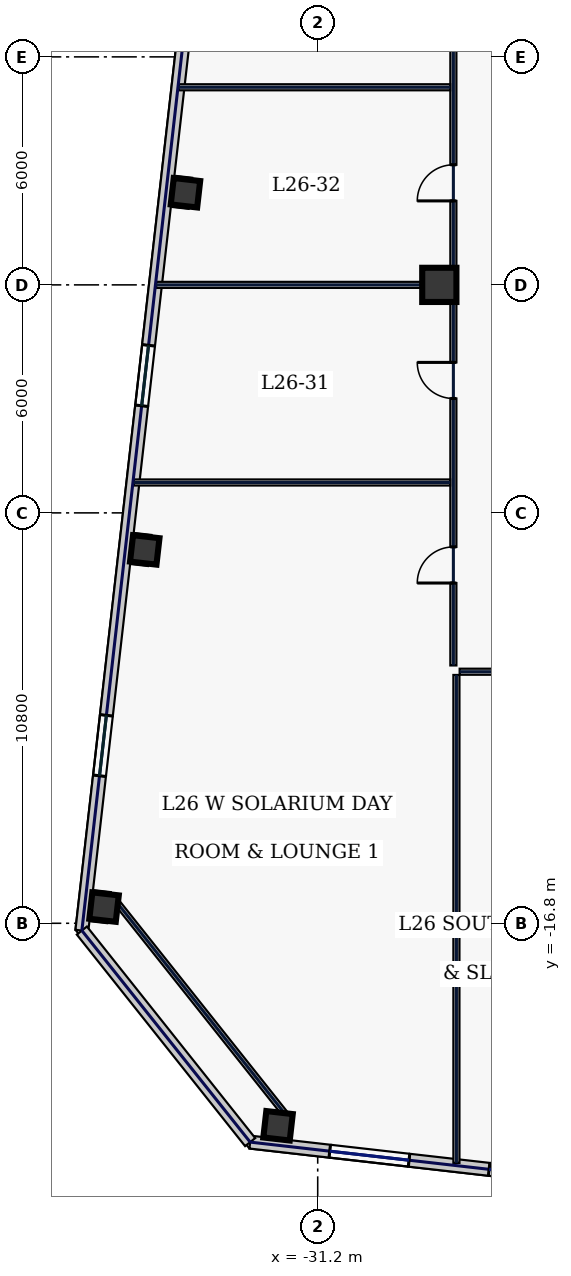
"""IFC4 building model, lengths in metres.
Left out: names, types, materials, properties, quantities, classifications, styles, units other than length and angle.
Written with IfcOpenShell. Run it as: python <this file> out.ifc"""

import sys

from ifc_helpers import new_model, si_unit, direction, frame, frame_2d, origin, origin_2d, place, context, subcontext, project, spatial, rectangle, hollow_rectangle, extrude, element, fill, save


model = new_model("IFC4")
c1 = context("Model", 3, precision=1e-05, world=origin(), true_north=direction((0.0, 1.0)))
c2 = subcontext(c1, "Body", "Model", "MODEL_VIEW")
j1 = project(units=[si_unit("LENGTHUNIT", "METRE"), si_unit("PLANEANGLEUNIT", "RADIAN")], contexts=[c1])
p1 = place(None, origin())
s1 = spatial("IfcSite", under=j1, at=p1, CompositionType="ELEMENT")
p2 = place(p1, origin())
s2 = spatial("IfcBuilding", under=s1, at=p2, CompositionType="ELEMENT")
p3 = place(p2, frame((0.0, 0.0, 117.4)))
s3 = spatial("IfcBuildingStorey", under=s2, at=p3, CompositionType="ELEMENT", Elevation=117.4)
p4 = place(p3, frame((-28.0, 0.0, 0.0), z_axis=(0.0, 0.0, 1.0), x_axis=(1.0, 0.0, 0.0)))
e1 = element("IfcColumn", 1, at=p4, inside=s3, PredefinedType="COLUMN", context=c2, shape_type="SweptSolid", body=[
    extrude(hollow_rectangle(XDim=0.9, YDim=0.9, WallThickness=0.04, at=origin_2d()), origin(), (0.0, 0.0, 1.0), 3.74),
])
for number, where, z_axis, x_axis in (
    (2, (-32.244, -22.129, 0.0), (0.0, 0.0, 1.0), (0.994, -0.113, 0.0)),
    (3, (-34.68, 2.425, 0.0), (0.0, 0.0, 1.0), (0.994, -0.113, 0.0)),
    (4, (-35.751, -6.974, 0.0), (0.0, 0.0, 1.0), (0.994, -0.113, 0.0)),
    (5, (-36.822, -16.374, 0.0), (0.0, 0.0, 1.0), (0.994, -0.113, 0.0)),
):
    element("IfcColumn", number, at=place(p3, frame(where, z_axis=z_axis, x_axis=x_axis)), inside=s3, PredefinedType="COLUMN", context=c2, shape_type="SweptSolid", body=[
        extrude(hollow_rectangle(XDim=0.7, YDim=0.7, WallThickness=0.032, at=origin_2d()), origin(), (0.0, 0.0, 1.0), 3.74),
    ])
p5 = place(p3, frame((-32.977, -22.559, 0.0), z_axis=(0.0, 0.0, 1.0), x_axis=(0.993571214605, -0.113208840243, 0.0)))
e6 = element("IfcWall", 6, at=p5, inside=s3, PredefinedType="STANDARD", context=c2, shape_type="SweptSolid", body=[
    extrude(rectangle(XDim=21.223, YDim=0.34, at=frame_2d((10.611, 0.0))), origin(), (0.0, 0.0, 1.0), 3.74),
])
p6 = place(p5, frame((2.108, 0.0, 0.67)))
e7 = element("IfcOpeningElement", 7, at=p6, cuts=e6, PredefinedType="OPENING", context=c2, shape_type="SweptSolid", body=[
    extrude(rectangle(XDim=2.1, YDim=2.2, at=frame_2d((1.05, 1.1))), frame((0.0, 0.18, 0.0), z_axis=(0.0, -1.0, 0.0), x_axis=(1.0, 0.0, 0.0)), (0.0, 0.0, 1.0), 0.36),
])
p7 = place(p5, frame((6.329, 0.0, 0.67)))
e8 = element("IfcOpeningElement", 8, at=p7, cuts=e6, PredefinedType="OPENING", context=c2, shape_type="SweptSolid", body=[
    extrude(rectangle(XDim=2.1, YDim=2.2, at=frame_2d((1.05, 1.1))), frame((0.0, 0.18, 0.0), z_axis=(0.0, -1.0, 0.0), x_axis=(1.0, 0.0, 0.0)), (0.0, 0.0, 1.0), 0.36),
])
p8 = place(p5, frame((11.285, 0.0, 0.67)))
e9 = element("IfcOpeningElement", 9, at=p8, cuts=e6, PredefinedType="OPENING", context=c2, shape_type="SweptSolid", body=[
    extrude(rectangle(XDim=2.1, YDim=2.2, at=frame_2d((1.05, 1.1))), frame((0.0, 0.18, 0.0), z_axis=(0.0, -1.0, 0.0), x_axis=(1.0, 0.0, 0.0)), (0.0, 0.0, 1.0), 0.36),
])
p9 = place(p5, frame((15.506, 0.0, 0.67)))
e10 = element("IfcOpeningElement", 10, at=p9, cuts=e6, PredefinedType="OPENING", context=c2, shape_type="SweptSolid", body=[
    extrude(rectangle(XDim=0.85, YDim=1.85, at=frame_2d((0.425, 0.925))), frame((0.0, 0.18, 0.0), z_axis=(0.0, -1.0, 0.0), x_axis=(1.0, 0.0, 0.0)), (0.0, 0.0, 1.0), 0.36),
])
p10 = place(p3, frame((-32.968, 21.957, 0.0), z_axis=(0.0, 0.0, 1.0), x_axis=(-0.113201605824, -0.993572038877, 0.0)))
e11 = element("IfcWall", 11, at=p10, inside=s3, PredefinedType="STANDARD", context=c2, shape_type="SweptSolid", body=[
    extrude(rectangle(XDim=39.2, YDim=0.34, at=frame_2d((19.6, 0.0))), origin(), (0.0, 0.0, 1.0), 3.74),
])
p11 = place(p10, frame((4.1, 0.0, 0.58)))
e12 = element("IfcOpeningElement", 12, at=p11, cuts=e11, PredefinedType="OPENING", context=c2, shape_type="SweptSolid", body=[
    extrude(rectangle(XDim=1.6, YDim=2.3, at=frame_2d((0.8, 1.15))), frame((0.0, 0.18, 0.0), z_axis=(0.0, -1.0, 0.0), x_axis=(1.0, 0.0, 0.0)), (0.0, 0.0, 1.0), 0.36),
])
p12 = place(p10, frame((13.9, 0.0, 0.58)))
e13 = element("IfcOpeningElement", 13, at=p12, cuts=e11, PredefinedType="OPENING", context=c2, shape_type="SweptSolid", body=[
    extrude(rectangle(XDim=1.6, YDim=2.3, at=frame_2d((0.8, 1.15))), frame((0.0, 0.18, 0.0), z_axis=(0.0, -1.0, 0.0), x_axis=(1.0, 0.0, 0.0)), (0.0, 0.0, 1.0), 0.36),
])
p13 = place(p10, frame((23.7, 0.0, 0.58)))
e14 = element("IfcOpeningElement", 14, at=p13, cuts=e11, PredefinedType="OPENING", context=c2, shape_type="SweptSolid", body=[
    extrude(rectangle(XDim=1.6, YDim=2.3, at=frame_2d((0.8, 1.15))), frame((0.0, 0.18, 0.0), z_axis=(0.0, -1.0, 0.0), x_axis=(1.0, 0.0, 0.0)), (0.0, 0.0, 1.0), 0.36),
])
p14 = place(p10, frame((33.5, 0.0, 0.58)))
e15 = element("IfcOpeningElement", 15, at=p14, cuts=e11, PredefinedType="OPENING", context=c2, shape_type="SweptSolid", body=[
    extrude(rectangle(XDim=1.6, YDim=2.3, at=frame_2d((0.8, 1.15))), frame((0.0, 0.18, 0.0), z_axis=(0.0, -1.0, 0.0), x_axis=(1.0, 0.0, 0.0)), (0.0, 0.0, 1.0), 0.36),
])
p15 = place(p3, frame((-37.406, -16.991, 0.0), z_axis=(0.0, 0.0, 1.0), x_axis=(0.622507800567, -0.78261359446, 0.0)))
e16 = element("IfcWall", 16, at=p15, inside=s3, PredefinedType="STANDARD", context=c2, shape_type="SweptSolid", body=[
    extrude(rectangle(XDim=7.114, YDim=0.34, at=frame_2d((3.557, 0.0))), origin(), (0.0, 0.0, 1.0), 3.74),
])
p16 = place(p3, frame((-36.556, -16.162, 0.0), z_axis=(0.0, 0.0, 1.0), x_axis=(0.622522641622, -0.782601789334, 0.0)))
e17 = element("IfcWall", 17, at=p16, inside=s3, PredefinedType="PARTITIONING", context=c2, shape_type="SweptSolid", body=[
    extrude(rectangle(XDim=7.354, YDim=0.16, at=frame_2d((3.677, 0.0))), origin(), (0.0, 0.0, 1.0), 3.74),
])
p17 = place(p3, frame((-27.63, -10.015, 0.0), z_axis=(0.0, 0.0, 1.0), x_axis=(0.0, 1.0, 0.0)))
e18 = element("IfcWall", 18, at=p17, inside=s3, PredefinedType="PARTITIONING", context=c2, shape_type="SweptSolid", body=[
    extrude(rectangle(XDim=20.13, YDim=0.16, at=frame_2d((10.065, 0.0))), origin(), (0.0, 0.0, 1.0), 3.74),
])
p18 = place(p17, frame((2.169, 0.0, 0.0)))
e19 = element("IfcOpeningElement", 19, at=p18, cuts=e18, PredefinedType="OPENING", context=c2, shape_type="SweptSolid", body=[
    extrude(rectangle(XDim=0.95, YDim=2.2, at=frame_2d((0.475, 1.1))), frame((0.0, 0.09, 0.0), z_axis=(0.0, -1.0, 0.0), x_axis=(1.0, 0.0, 0.0)), (0.0, 0.0, 1.0), 0.18),
])
p19 = place(p17, frame((7.025, 0.0, 0.0)))
e20 = element("IfcOpeningElement", 20, at=p19, cuts=e18, PredefinedType="OPENING", context=c2, shape_type="SweptSolid", body=[
    extrude(rectangle(XDim=0.95, YDim=2.2, at=frame_2d((0.475, 1.1))), frame((0.0, 0.09, 0.0), z_axis=(0.0, -1.0, 0.0), x_axis=(1.0, 0.0, 0.0)), (0.0, 0.0, 1.0), 0.18),
])
p20 = place(p17, frame((12.225, 0.0, 0.0)))
e21 = element("IfcOpeningElement", 21, at=p20, cuts=e18, PredefinedType="OPENING", context=c2, shape_type="SweptSolid", body=[
    extrude(rectangle(XDim=0.95, YDim=2.2, at=frame_2d((0.475, 1.1))), frame((0.0, 0.09, 0.0), z_axis=(0.0, -1.0, 0.0), x_axis=(1.0, 0.0, 0.0)), (0.0, 0.0, 1.0), 0.18),
])
p21 = place(p17, frame((17.131, 0.0, 0.0)))
e22 = element("IfcOpeningElement", 22, at=p21, cuts=e18, PredefinedType="OPENING", context=c2, shape_type="SweptSolid", body=[
    extrude(rectangle(XDim=0.95, YDim=2.2, at=frame_2d((0.475, 1.1))), frame((0.0, 0.09, 0.0), z_axis=(0.0, -1.0, 0.0), x_axis=(1.0, 0.0, 0.0)), (0.0, 0.0, 1.0), 0.18),
])
p22 = place(p3, frame((27.465, -10.18, 0.0), z_axis=(0.0, 0.0, 1.0), x_axis=(-1.0, 0.0, 0.0)))
e23 = element("IfcWall", 23, at=p22, inside=s3, PredefinedType="PARTITIONING", context=c2, shape_type="SweptSolid", body=[
    extrude(rectangle(XDim=54.93, YDim=0.16, at=frame_2d((27.465, 0.0))), origin(), (0.0, 0.0, 1.0), 3.74),
])
p23 = place(p22, frame((52.106, 0.0, 0.0)))
e24 = element("IfcOpeningElement", 24, at=p23, cuts=e23, PredefinedType="OPENING", context=c2, shape_type="SweptSolid", body=[
    extrude(rectangle(XDim=1.05, YDim=2.2, at=frame_2d((0.525, 1.1))), frame((0.0, 0.09, 0.0), z_axis=(0.0, -1.0, 0.0), x_axis=(1.0, 0.0, 0.0)), (0.0, 0.0, 1.0), 0.18),
])
p24 = place(p22, frame((46.125, 0.0, 0.0)))
e25 = element("IfcOpeningElement", 25, at=p24, cuts=e23, PredefinedType="OPENING", context=c2, shape_type="SweptSolid", body=[
    extrude(rectangle(XDim=0.95, YDim=2.2, at=frame_2d((0.475, 1.1))), frame((0.0, 0.09, 0.0), z_axis=(0.0, -1.0, 0.0), x_axis=(1.0, 0.0, 0.0)), (0.0, 0.0, 1.0), 0.18),
])
p25 = place(p22, frame((39.25, 0.0, 0.0)))
e26 = element("IfcOpeningElement", 26, at=p25, cuts=e23, PredefinedType="OPENING", context=c2, shape_type="SweptSolid", body=[
    extrude(rectangle(XDim=0.95, YDim=2.2, at=frame_2d((0.475, 1.1))), frame((0.0, 0.09, 0.0), z_axis=(0.0, -1.0, 0.0), x_axis=(1.0, 0.0, 0.0)), (0.0, 0.0, 1.0), 0.18),
])
p26 = place(p22, frame((33.65, 0.0, 0.0)))
e27 = element("IfcOpeningElement", 27, at=p26, cuts=e23, PredefinedType="OPENING", context=c2, shape_type="SweptSolid", body=[
    extrude(rectangle(XDim=0.95, YDim=2.2, at=frame_2d((0.475, 1.1))), frame((0.0, 0.09, 0.0), z_axis=(0.0, -1.0, 0.0), x_axis=(1.0, 0.0, 0.0)), (0.0, 0.0, 1.0), 0.18),
])
p27 = place(p22, frame((27.775, 0.0, 0.0)))
e28 = element("IfcOpeningElement", 28, at=p27, cuts=e23, PredefinedType="OPENING", context=c2, shape_type="SweptSolid", body=[
    extrude(rectangle(XDim=1.3, YDim=2.2, at=frame_2d((0.65, 1.1))), frame((0.0, 0.09, 0.0), z_axis=(0.0, -1.0, 0.0), x_axis=(1.0, 0.0, 0.0)), (0.0, 0.0, 1.0), 0.18),
])
p28 = place(p22, frame((21.975, 0.0, 0.0)))
e29 = element("IfcOpeningElement", 29, at=p28, cuts=e23, PredefinedType="OPENING", context=c2, shape_type="SweptSolid", body=[
    extrude(rectangle(XDim=1.3, YDim=2.2, at=frame_2d((0.65, 1.1))), frame((0.0, 0.09, 0.0), z_axis=(0.0, -1.0, 0.0), x_axis=(1.0, 0.0, 0.0)), (0.0, 0.0, 1.0), 0.18),
])
p29 = place(p22, frame((16.475, 0.0, 0.0)))
e30 = element("IfcOpeningElement", 30, at=p29, cuts=e23, PredefinedType="OPENING", context=c2, shape_type="SweptSolid", body=[
    extrude(rectangle(XDim=1.3, YDim=2.2, at=frame_2d((0.65, 1.1))), frame((0.0, 0.09, 0.0), z_axis=(0.0, -1.0, 0.0), x_axis=(1.0, 0.0, 0.0)), (0.0, 0.0, 1.0), 0.18),
])
p30 = place(p22, frame((11.45, 0.0, 0.0)))
e31 = element("IfcOpeningElement", 31, at=p30, cuts=e23, PredefinedType="OPENING", context=c2, shape_type="SweptSolid", body=[
    extrude(rectangle(XDim=0.95, YDim=2.2, at=frame_2d((0.475, 1.1))), frame((0.0, 0.09, 0.0), z_axis=(0.0, -1.0, 0.0), x_axis=(1.0, 0.0, 0.0)), (0.0, 0.0, 1.0), 0.18),
])
p31 = place(p22, frame((6.625, 0.0, 0.0)))
e32 = element("IfcOpeningElement", 32, at=p31, cuts=e23, PredefinedType="OPENING", context=c2, shape_type="SweptSolid", body=[
    extrude(rectangle(XDim=0.95, YDim=2.2, at=frame_2d((0.475, 1.1))), frame((0.0, 0.09, 0.0), z_axis=(0.0, -1.0, 0.0), x_axis=(1.0, 0.0, 0.0)), (0.0, 0.0, 1.0), 0.18),
])
p32 = place(p22, frame((2.044, 0.0, 0.0)))
e33 = element("IfcOpeningElement", 33, at=p32, cuts=e23, PredefinedType="OPENING", context=c2, shape_type="SweptSolid", body=[
    extrude(rectangle(XDim=0.95, YDim=2.2, at=frame_2d((0.475, 1.1))), frame((0.0, 0.09, 0.0), z_axis=(0.0, -1.0, 0.0), x_axis=(1.0, 0.0, 0.0)), (0.0, 0.0, 1.0), 0.18),
])
p33 = place(p3, frame((-27.55, -23.106, 0.0), z_axis=(0.0, 0.0, 1.0), x_axis=(0.0, 1.0, 0.0)))
e34 = element("IfcWall", 34, at=p33, inside=s3, PredefinedType="PARTITIONING", context=c2, shape_type="SweptSolid", body=[
    extrude(rectangle(XDim=12.842, YDim=0.16, at=frame_2d((6.421, 0.0))), origin(), (0.0, 0.0, 1.0), 3.74),
])
p34 = place(p3, frame((-36.042, -5.2, 0.0), z_axis=(0.0, 0.0, 1.0), x_axis=(1.0, 0.0, 0.0)))
e35 = element("IfcWall", 35, at=p34, inside=s3, PredefinedType="PARTITIONING", context=c2, shape_type="SweptSolid", body=[
    extrude(rectangle(XDim=8.327, YDim=0.16, at=frame_2d((4.164, 0.0))), origin(), (0.0, 0.0, 1.0), 3.74),
])
p35 = place(p3, frame((-35.449, 0.0, 0.0), z_axis=(0.0, 0.0, 1.0), x_axis=(1.0, 0.0, 0.0)))
e36 = element("IfcWall", 36, at=p35, inside=s3, PredefinedType="PARTITIONING", context=c2, shape_type="SweptSolid", body=[
    extrude(rectangle(XDim=7.734, YDim=0.16, at=frame_2d((3.867, 0.0))), origin(), (0.0, 0.0, 1.0), 3.74),
])
p36 = place(p3, frame((-34.857, 5.2, 0.0), z_axis=(0.0, 0.0, 1.0), x_axis=(1.0, 0.0, 0.0)))
e37 = element("IfcWall", 37, at=p36, inside=s3, PredefinedType="PARTITIONING", context=c2, shape_type="SweptSolid", body=[
    extrude(rectangle(XDim=7.142, YDim=0.16, at=frame_2d((3.571, 0.0))), origin(), (0.0, 0.0, 1.0), 3.74),
])
p37 = place(p6, origin())
e38 = element("IfcWindow", 38, at=p37, inside=s3, PartitioningType="SINGLE_PANEL", PredefinedType="WINDOW", context=c2, shape_type="SweptSolid", body=[
    extrude(rectangle(XDim=2.1, YDim=2.2, at=frame_2d((1.05, 1.1))), frame((0.0, 0.03, 0.0), z_axis=(0.0, -1.0, 0.0), x_axis=(1.0, 0.0, 0.0)), (0.0, 0.0, 1.0), 0.06),
])
fill(e7, e38)
p38 = place(p7, origin())
e39 = element("IfcWindow", 39, at=p38, inside=s3, PartitioningType="SINGLE_PANEL", PredefinedType="WINDOW", context=c2, shape_type="SweptSolid", body=[
    extrude(rectangle(XDim=2.1, YDim=2.2, at=frame_2d((1.05, 1.1))), frame((0.0, 0.03, 0.0), z_axis=(0.0, -1.0, 0.0), x_axis=(1.0, 0.0, 0.0)), (0.0, 0.0, 1.0), 0.06),
])
fill(e8, e39)
p39 = place(p13, origin())
e40 = element("IfcWindow", 40, at=p39, inside=s3, PartitioningType="SINGLE_PANEL", PredefinedType="WINDOW", context=c2, shape_type="SweptSolid", body=[
    extrude(rectangle(XDim=1.6, YDim=2.3, at=frame_2d((0.8, 1.15))), frame((0.0, 0.03, 0.0), z_axis=(0.0, -1.0, 0.0), x_axis=(1.0, 0.0, 0.0)), (0.0, 0.0, 1.0), 0.06),
])
fill(e14, e40)
p40 = place(p14, origin())
e41 = element("IfcWindow", 41, at=p40, inside=s3, PartitioningType="SINGLE_PANEL", PredefinedType="WINDOW", context=c2, shape_type="SweptSolid", body=[
    extrude(rectangle(XDim=1.6, YDim=2.3, at=frame_2d((0.8, 1.15))), frame((0.0, 0.03, 0.0), z_axis=(0.0, -1.0, 0.0), x_axis=(1.0, 0.0, 0.0)), (0.0, 0.0, 1.0), 0.06),
])
fill(e15, e41)
p41 = place(p18, origin())
e42 = element("IfcDoor", 42, at=p41, inside=s3, OperationType="SINGLE_SWING_LEFT", PredefinedType="DOOR", context=c2, shape_type="SweptSolid", body=[
    extrude(rectangle(XDim=0.95, YDim=2.2, at=frame_2d((0.475, 1.1))), frame((0.0, 0.025, 0.0), z_axis=(0.0, -1.0, 0.0), x_axis=(1.0, 0.0, 0.0)), (0.0, 0.0, 1.0), 0.05),
])
fill(e19, e42)
p42 = place(p19, origin())
e43 = element("IfcDoor", 43, at=p42, inside=s3, OperationType="SINGLE_SWING_RIGHT", PredefinedType="DOOR", context=c2, shape_type="SweptSolid", body=[
    extrude(rectangle(XDim=0.95, YDim=2.2, at=frame_2d((0.475, 1.1))), frame((0.0, 0.025, 0.0), z_axis=(0.0, -1.0, 0.0), x_axis=(1.0, 0.0, 0.0)), (0.0, 0.0, 1.0), 0.05),
])
fill(e20, e43)
p43 = place(p20, origin())
e44 = element("IfcDoor", 44, at=p43, inside=s3, OperationType="SINGLE_SWING_LEFT", PredefinedType="DOOR", context=c2, shape_type="SweptSolid", body=[
    extrude(rectangle(XDim=0.95, YDim=2.2, at=frame_2d((0.475, 1.1))), frame((0.0, 0.025, 0.0), z_axis=(0.0, -1.0, 0.0), x_axis=(1.0, 0.0, 0.0)), (0.0, 0.0, 1.0), 0.05),
])
fill(e21, e44)
save(model, sys.argv[1])
